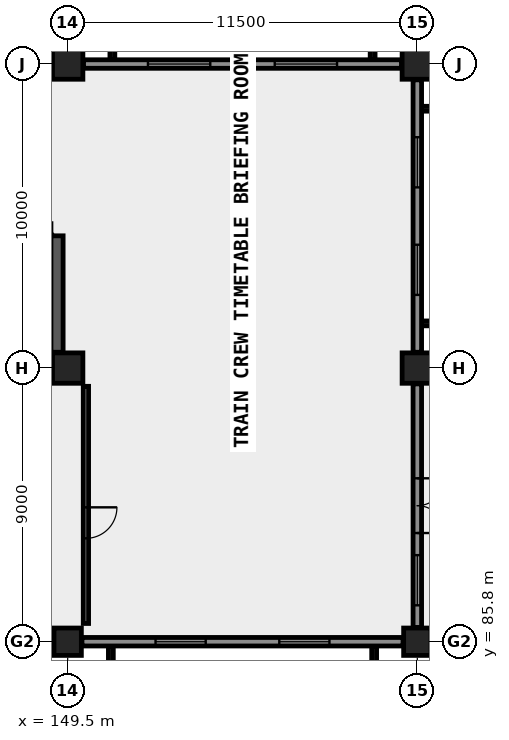
"""IFC4 building model, lengths in metres.
Left out: names, types, materials, properties, quantities, classifications, styles, units other than length and angle.
Written with IfcOpenShell. Run it as: python <this file> out.ifc"""

import sys

from ifc_helpers import new_model, si_unit, direction, frame, frame_2d, origin, origin_2d, place, context, subcontext, project, spatial, rectangle, extrude, element, fill, save


model = new_model("IFC4")
c1 = context("Model", 3, precision=1e-05, world=origin(), true_north=direction((0.0, 1.0)))
c2 = subcontext(c1, "Body", "Model", "MODEL_VIEW")
j1 = project(units=[si_unit("LENGTHUNIT", "METRE"), si_unit("PLANEANGLEUNIT", "RADIAN")], contexts=[c1])
p1 = place(None, origin())
s1 = spatial("IfcSite", under=j1, at=p1, CompositionType="ELEMENT")
p2 = place(p1, origin())
s2 = spatial("IfcBuilding", under=s1, at=p2, CompositionType="ELEMENT")
p3 = place(p2, frame((0.0, 0.0, 13.8)))
s3 = spatial("IfcBuildingStorey", under=s2, at=p3, CompositionType="ELEMENT", Elevation=13.8)
p4 = place(p3, frame((149.5, 85.8, 0.0), z_axis=(0.0, 0.0, 1.0), x_axis=(1.0, 0.0, 0.0)))
e1 = element("IfcColumn", 1, at=p4, inside=s3, PredefinedType="COLUMN", context=c2, shape_type="SweptSolid", body=[
    extrude(rectangle(XDim=0.9, YDim=0.9, at=origin_2d()), origin(), (0.0, 0.0, 1.0), 4.5),
])
for number, where, z_axis, x_axis in (
    (2, (149.5, 94.8, 0.0), (0.0, 0.0, 1.0), (1.0, 0.0, 0.0)),
    (3, (149.5, 104.8, 0.0), (0.0, 0.0, 1.0), (1.0, 0.0, 0.0)),
):
    element("IfcColumn", number, at=place(p3, frame(where, z_axis=z_axis, x_axis=x_axis)), inside=s3, PredefinedType="COLUMN", context=c2, shape_type="SweptSolid", body=[
        extrude(rectangle(XDim=1.0, YDim=1.0, at=origin_2d()), origin(), (0.0, 0.0, 1.0), 4.5),
    ])
p5 = place(p3, frame((161.0, 85.8, 0.0), z_axis=(0.0, 0.0, 1.0), x_axis=(1.0, 0.0, 0.0)))
e4 = element("IfcColumn", 4, at=p5, inside=s3, PredefinedType="COLUMN", context=c2, shape_type="SweptSolid", body=[
    extrude(rectangle(XDim=0.9, YDim=0.9, at=origin_2d()), origin(), (0.0, 0.0, 1.0), 4.5),
])
for number, where, z_axis, x_axis in (
    (5, (161.0, 94.8, 0.0), (0.0, 0.0, 1.0), (1.0, 0.0, 0.0)),
    (6, (161.0, 104.8, 0.0), (0.0, 0.0, 1.0), (1.0, 0.0, 0.0)),
):
    element("IfcColumn", number, at=place(p3, frame(where, z_axis=z_axis, x_axis=x_axis)), inside=s3, PredefinedType="COLUMN", context=c2, shape_type="SweptSolid", body=[
        extrude(rectangle(XDim=1.0, YDim=1.0, at=origin_2d()), origin(), (0.0, 0.0, 1.0), 4.5),
    ])
p6 = place(p3, frame((149.15, 95.32, 0.0), z_axis=(0.0, 0.0, 1.0), x_axis=(0.0, 1.0, 0.0)))
e7 = element("IfcWall", 7, at=p6, inside=s3, PredefinedType="SHEAR", context=c2, shape_type="SweptSolid", body=[
    extrude(rectangle(XDim=3.83, YDim=0.4, at=frame_2d((1.915, 0.0))), origin(), (0.0, 0.0, 1.0), 4.5),
])
p7 = place(p3, frame((148.68, 85.8, 0.0), z_axis=(0.0, 0.0, 1.0), x_axis=(1.0, 0.0, 0.0)))
e8 = element("IfcWall", 8, at=p7, inside=s3, PredefinedType="SOLIDWALL", context=c2, shape_type="SweptSolid", body=[
    extrude(rectangle(XDim=0.35, YDim=0.28, at=frame_2d((0.175, 0.0))), origin(), (0.0, 0.0, 1.0), 4.23),
])
p8 = place(p3, frame((149.97, 85.8, 0.0), z_axis=(0.0, 0.0, 1.0), x_axis=(1.0, 0.0, 0.0)))
e9 = element("IfcWall", 9, at=p8, inside=s3, PredefinedType="SOLIDWALL", context=c2, shape_type="SweptSolid", body=[
    extrude(rectangle(XDim=10.56, YDim=0.28, at=frame_2d((5.28, 0.0))), origin(), (0.0, 0.0, 1.0), 3.45),
])
p9 = place(p8, frame((2.42, 0.0, 0.85)))
e10 = element("IfcOpeningElement", 10, at=p9, cuts=e9, PredefinedType="OPENING", context=c2, shape_type="SweptSolid", body=[
    extrude(rectangle(XDim=1.65, YDim=1.9, at=frame_2d((0.825, 0.95))), frame((0.0, 0.15, 0.0), z_axis=(0.0, -1.0, 0.0), x_axis=(1.0, 0.0, 0.0)), (0.0, 0.0, 1.0), 0.3),
])
p10 = place(p8, frame((6.49, 0.0, 0.85)))
e11 = element("IfcOpeningElement", 11, at=p10, cuts=e9, PredefinedType="OPENING", context=c2, shape_type="SweptSolid", body=[
    extrude(rectangle(XDim=1.65, YDim=1.9, at=frame_2d((0.825, 0.95))), frame((0.0, 0.15, 0.0), z_axis=(0.0, -1.0, 0.0), x_axis=(1.0, 0.0, 0.0)), (0.0, 0.0, 1.0), 0.3),
])
p11 = place(p3, frame((161.0, 86.27, 0.0), z_axis=(0.0, 0.0, 1.0), x_axis=(0.0, 1.0, 0.0)))
e12 = element("IfcWall", 12, at=p11, inside=s3, PredefinedType="SOLIDWALL", context=c2, shape_type="SweptSolid", body=[
    extrude(rectangle(XDim=8.01, YDim=0.28, at=frame_2d((4.005, 0.0))), origin(), (0.0, 0.0, 1.0), 3.45),
])
p12 = place(p11, frame((3.105, 0.0, 0.0)))
e13 = element("IfcOpeningElement", 13, at=p12, cuts=e12, PredefinedType="OPENING", context=c2, shape_type="SweptSolid", body=[
    extrude(rectangle(XDim=1.8, YDim=2.25, at=frame_2d((0.9, 1.125))), frame((0.0, 0.15, 0.0), z_axis=(0.0, -1.0, 0.0), x_axis=(1.0, 0.0, 0.0)), (0.0, 0.0, 1.0), 0.3),
])
p13 = place(p11, frame((0.728, 0.0, 0.78)))
e14 = element("IfcOpeningElement", 14, at=p13, cuts=e12, PredefinedType="OPENING", context=c2, shape_type="SweptSolid", body=[
    extrude(rectangle(XDim=1.65, YDim=1.9, at=frame_2d((0.825, 0.95))), frame((0.0, 0.15, 0.0), z_axis=(0.0, -1.0, 0.0), x_axis=(1.0, 0.0, 0.0)), (0.0, 0.0, 1.0), 0.3),
])
p14 = place(p3, frame((161.0, 95.32, 0.0), z_axis=(0.0, 0.0, 1.0), x_axis=(0.0, 1.0, 0.0)))
e15 = element("IfcWall", 15, at=p14, inside=s3, PredefinedType="SOLIDWALL", context=c2, shape_type="SweptSolid", body=[
    extrude(rectangle(XDim=8.96, YDim=0.28, at=frame_2d((4.48, 0.0))), origin(), (0.0, 0.0, 1.0), 3.45),
])
p15 = place(p14, frame((1.887, 0.0, 0.85)))
e16 = element("IfcOpeningElement", 16, at=p15, cuts=e15, PredefinedType="OPENING", context=c2, shape_type="SweptSolid", body=[
    extrude(rectangle(XDim=1.65, YDim=1.9, at=frame_2d((0.825, 0.95))), frame((0.0, 0.15, 0.0), z_axis=(0.0, -1.0, 0.0), x_axis=(1.0, 0.0, 0.0)), (0.0, 0.0, 1.0), 0.3),
])
p16 = place(p14, frame((5.423, 0.0, 0.85)))
e17 = element("IfcOpeningElement", 17, at=p16, cuts=e15, PredefinedType="OPENING", context=c2, shape_type="SweptSolid", body=[
    extrude(rectangle(XDim=1.65, YDim=1.9, at=frame_2d((0.825, 0.95))), frame((0.0, 0.15, 0.0), z_axis=(0.0, -1.0, 0.0), x_axis=(1.0, 0.0, 0.0)), (0.0, 0.0, 1.0), 0.3),
])
p17 = place(p3, frame((150.02, 104.8, 0.0), z_axis=(0.0, 0.0, 1.0), x_axis=(1.0, 0.0, 0.0)))
e18 = element("IfcWall", 18, at=p17, inside=s3, PredefinedType="SOLIDWALL", context=c2, shape_type="SweptSolid", body=[
    extrude(rectangle(XDim=10.46, YDim=0.28, at=frame_2d((5.23, 0.0))), origin(), (0.0, 0.0, 1.0), 3.45),
])
p18 = place(p17, frame((2.12, 0.0, 0.85)))
e19 = element("IfcOpeningElement", 19, at=p18, cuts=e18, PredefinedType="OPENING", context=c2, shape_type="SweptSolid", body=[
    extrude(rectangle(XDim=2.05, YDim=1.9, at=frame_2d((1.025, 0.95))), frame((0.0, 0.15, 0.0), z_axis=(0.0, -1.0, 0.0), x_axis=(1.0, 0.0, 0.0)), (0.0, 0.0, 1.0), 0.3),
])
p19 = place(p17, frame((6.29, 0.0, 0.85)))
e20 = element("IfcOpeningElement", 20, at=p19, cuts=e18, PredefinedType="OPENING", context=c2, shape_type="SweptSolid", body=[
    extrude(rectangle(XDim=2.05, YDim=1.9, at=frame_2d((1.025, 0.95))), frame((0.0, 0.15, 0.0), z_axis=(0.0, -1.0, 0.0), x_axis=(1.0, 0.0, 0.0)), (0.0, 0.0, 1.0), 0.3),
])
p20 = place(p3, frame((150.1, 86.4, 0.0), z_axis=(0.0, 0.0, 1.0), x_axis=(0.0, 1.0, 0.0)))
e21 = element("IfcWall", 21, at=p20, inside=s3, PredefinedType="PARTITIONING", context=c2, shape_type="SweptSolid", body=[
    extrude(rectangle(XDim=7.8, YDim=0.175, at=frame_2d((3.9, 0.0))), origin(), (0.0, 0.0, 1.0), 4.22),
])
p21 = place(p20, frame((2.8, 0.0, 0.0)))
e22 = element("IfcOpeningElement", 22, at=p21, cuts=e21, PredefinedType="OPENING", context=c2, shape_type="SweptSolid", body=[
    extrude(rectangle(XDim=1.02, YDim=2.15, at=frame_2d((0.51, 1.075))), frame((0.0, 0.098, 0.0), z_axis=(0.0, -1.0, 0.0), x_axis=(1.0, 0.0, 0.0)), (0.0, 0.0, 1.0), 0.195),
])
p22 = place(p9, origin())
e23 = element("IfcWindow", 23, at=p22, inside=s3, PartitioningType="SINGLE_PANEL", PredefinedType="WINDOW", context=c2, shape_type="SweptSolid", body=[
    extrude(rectangle(XDim=1.65, YDim=1.9, at=frame_2d((0.825, 0.95))), frame((0.0, 0.03, 0.0), z_axis=(0.0, -1.0, 0.0), x_axis=(1.0, 0.0, 0.0)), (0.0, 0.0, 1.0), 0.06),
])
fill(e10, e23)
p23 = place(p10, origin())
e24 = element("IfcWindow", 24, at=p23, inside=s3, PartitioningType="SINGLE_PANEL", PredefinedType="WINDOW", context=c2, shape_type="SweptSolid", body=[
    extrude(rectangle(XDim=1.65, YDim=1.9, at=frame_2d((0.825, 0.95))), frame((0.0, 0.03, 0.0), z_axis=(0.0, -1.0, 0.0), x_axis=(1.0, 0.0, 0.0)), (0.0, 0.0, 1.0), 0.06),
])
fill(e11, e24)
p24 = place(p12, frame((0.9, 0.0, 0.0), z_axis=(0.0, 0.0, 1.0), x_axis=(-1.0, 0.0, 0.0)))
e25 = element("IfcDoor", 25, at=p24, inside=s3, OperationType="DOUBLE_DOOR_SINGLE_SWING", PredefinedType="DOOR", context=c2, shape_type="SweptSolid", body=[
    extrude(rectangle(XDim=1.8, YDim=2.25, at=frame_2d((0.0, 1.125))), frame((0.0, 0.025, 0.0), z_axis=(0.0, -1.0, 0.0), x_axis=(1.0, 0.0, 0.0)), (0.0, 0.0, 1.0), 0.05),
])
fill(e13, e25)
p25 = place(p13, origin())
e26 = element("IfcWindow", 26, at=p25, inside=s3, PartitioningType="SINGLE_PANEL", PredefinedType="WINDOW", context=c2, shape_type="SweptSolid", body=[
    extrude(rectangle(XDim=1.65, YDim=1.9, at=frame_2d((0.825, 0.95))), frame((0.0, 0.03, 0.0), z_axis=(0.0, -1.0, 0.0), x_axis=(1.0, 0.0, 0.0)), (0.0, 0.0, 1.0), 0.06),
])
fill(e14, e26)
p26 = place(p15, origin())
e27 = element("IfcWindow", 27, at=p26, inside=s3, PartitioningType="SINGLE_PANEL", PredefinedType="WINDOW", context=c2, shape_type="SweptSolid", body=[
    extrude(rectangle(XDim=1.65, YDim=1.9, at=frame_2d((0.825, 0.95))), frame((0.0, 0.03, 0.0), z_axis=(0.0, -1.0, 0.0), x_axis=(1.0, 0.0, 0.0)), (0.0, 0.0, 1.0), 0.06),
])
fill(e16, e27)
p27 = place(p16, origin())
e28 = element("IfcWindow", 28, at=p27, inside=s3, PartitioningType="SINGLE_PANEL", PredefinedType="WINDOW", context=c2, shape_type="SweptSolid", body=[
    extrude(rectangle(XDim=1.65, YDim=1.9, at=frame_2d((0.825, 0.95))), frame((0.0, 0.03, 0.0), z_axis=(0.0, -1.0, 0.0), x_axis=(1.0, 0.0, 0.0)), (0.0, 0.0, 1.0), 0.06),
])
fill(e17, e28)
p28 = place(p18, origin())
e29 = element("IfcWindow", 29, at=p28, inside=s3, PartitioningType="SINGLE_PANEL", PredefinedType="WINDOW", context=c2, shape_type="SweptSolid", body=[
    extrude(rectangle(XDim=2.05, YDim=1.9, at=frame_2d((1.025, 0.95))), frame((0.0, 0.03, 0.0), z_axis=(0.0, -1.0, 0.0), x_axis=(1.0, 0.0, 0.0)), (0.0, 0.0, 1.0), 0.06),
])
fill(e19, e29)
p29 = place(p19, origin())
e30 = element("IfcWindow", 30, at=p29, inside=s3, PartitioningType="SINGLE_PANEL", PredefinedType="WINDOW", context=c2, shape_type="SweptSolid", body=[
    extrude(rectangle(XDim=2.05, YDim=1.9, at=frame_2d((1.025, 0.95))), frame((0.0, 0.03, 0.0), z_axis=(0.0, -1.0, 0.0), x_axis=(1.0, 0.0, 0.0)), (0.0, 0.0, 1.0), 0.06),
])
fill(e20, e30)
p30 = place(p21, origin())
e31 = element("IfcDoor", 31, at=p30, inside=s3, OperationType="SINGLE_SWING_RIGHT", PredefinedType="DOOR", context=c2, shape_type="SweptSolid", body=[
    extrude(rectangle(XDim=1.02, YDim=2.15, at=frame_2d((0.51, 1.075))), frame((0.0, 0.025, 0.0), z_axis=(0.0, -1.0, 0.0), x_axis=(1.0, 0.0, 0.0)), (0.0, 0.0, 1.0), 0.05),
])
fill(e22, e31)
save(model, sys.argv[1])
